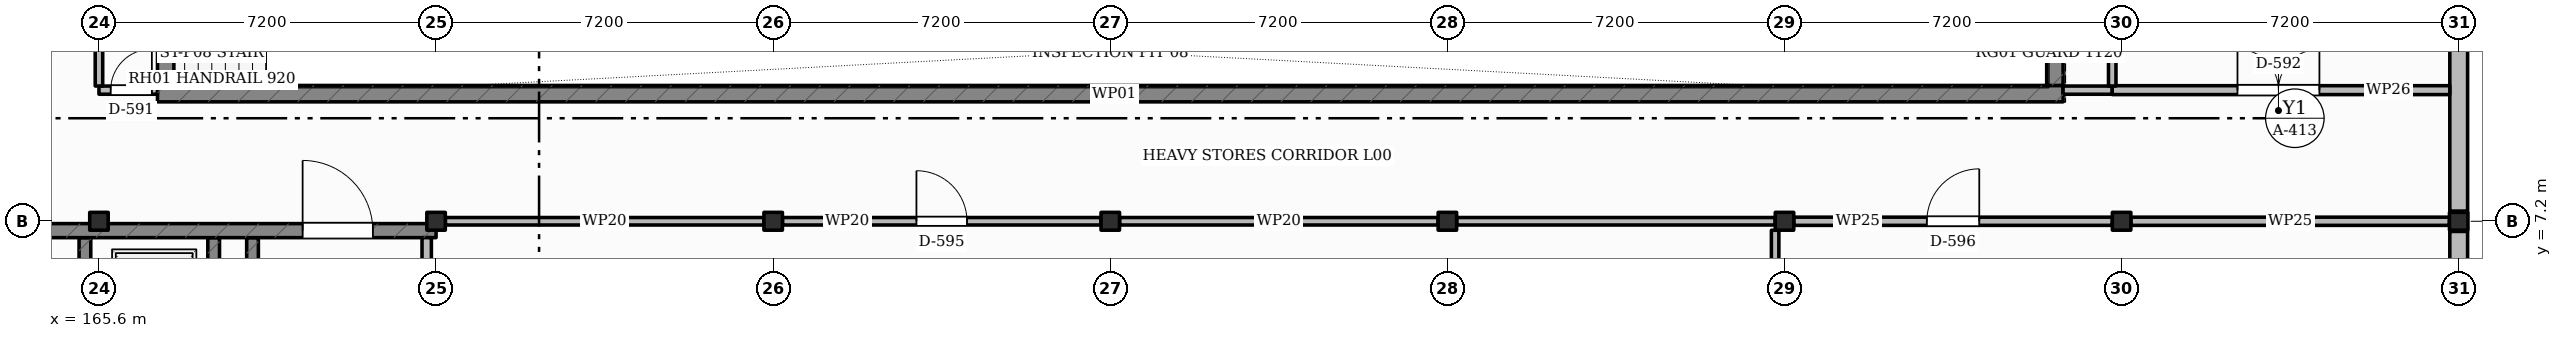
"""IFC4 building model, lengths in metres.
Left out: names, types, materials, properties, quantities, classifications, styles, units other than length and angle.
Written with IfcOpenShell. Run it as: python <this file> out.ifc"""

import sys

from ifc_helpers import new_model, si_unit, direction, frame, frame_2d, origin, origin_2d, place, context, subcontext, project, spatial, rectangle, i_section, extrude, element, fill, save


model = new_model("IFC4")
c1 = context("Model", 3, precision=1e-05, world=origin(), true_north=direction((0.0, 1.0)))
c2 = subcontext(c1, "Body", "Model", "MODEL_VIEW")
j1 = project(units=[si_unit("LENGTHUNIT", "METRE"), si_unit("PLANEANGLEUNIT", "RADIAN")], contexts=[c1])
p1 = place(None, origin())
s1 = spatial("IfcSite", under=j1, at=p1, CompositionType="ELEMENT")
p2 = place(p1, origin())
s2 = spatial("IfcBuilding", under=s1, at=p2, CompositionType="ELEMENT")
p3 = place(p2, origin())
s3 = spatial("IfcBuildingStorey", under=s2, at=p3, CompositionType="ELEMENT", Elevation=0.0)
p4 = place(p3, frame((166.85, 9.925, -1.55), z_axis=(0.0, 0.0, 1.0), x_axis=(1.0, 0.0, 0.0)))
e1 = element("IfcWall", 1, at=p4, inside=s3, PredefinedType="USERDEFINED", context=c2, shape_type="SweptSolid", body=[
    extrude(rectangle(XDim=40.7, YDim=0.35, at=frame_2d((20.35, 0.0))), origin(), (0.0, 0.0, 1.0), 1.55),
])
for number, where, z_axis, x_axis in (
    (2, (167.025, 10.1, -1.55), (0.0, 0.0, 1.0), (0.0, 1.0, 0.0)),
    (3, (207.375, 10.1, -1.55), (0.0, 0.0, 1.0), (0.0, 1.0, 0.0)),
):
    element("IfcWall", number, at=place(p3, frame(where, z_axis=z_axis, x_axis=x_axis)), inside=s3, PredefinedType="USERDEFINED", context=c2, shape_type="SweptSolid", body=[
        extrude(rectangle(XDim=1.4, YDim=0.35, at=frame_2d((0.7, 0.0))), origin(), (0.0, 0.0, 1.0), 1.55),
    ])
for number, where, z_axis, x_axis in (
    (4, (165.6, 7.2, -0.3), (0.0, 0.0, 1.0), (1.0, 0.0, 0.0)),
    (5, (172.8, 7.2, -0.3), (0.0, 0.0, 1.0), (1.0, 0.0, 0.0)),
    (6, (180.0, 7.2, -0.3), (0.0, 0.0, 1.0), (1.0, 0.0, 0.0)),
    (7, (187.2, 7.2, -0.3), (0.0, 0.0, 1.0), (1.0, 0.0, 0.0)),
    (8, (194.4, 7.2, -0.3), (0.0, 0.0, 1.0), (1.0, 0.0, 0.0)),
    (9, (201.6, 7.2, -0.3), (0.0, 0.0, 1.0), (1.0, 0.0, 0.0)),
    (10, (208.8, 7.2, -0.3), (0.0, 0.0, 1.0), (1.0, 0.0, 0.0)),
    (11, (216.0, 7.2, -0.3), (0.0, 0.0, 1.0), (1.0, 0.0, 0.0)),
):
    element("IfcColumn", number, at=place(p3, frame(where, z_axis=z_axis, x_axis=x_axis)), inside=s3, PredefinedType="COLUMN", context=c2, shape_type="SweptSolid", body=[
        extrude(i_section(OverallWidth=0.395, OverallDepth=0.381, WebThickness=0.018, FlangeThickness=0.03, FilletRadius=0.015, at=origin_2d()), origin(), (0.0, 0.0, 1.0), 5.7),
    ])
p5 = place(p3, frame((216.0, 14.183, 0.0), z_axis=(0.0, 0.0, 1.0), x_axis=(0.0, -1.0, 0.0)))
e12 = element("IfcWall", 12, at=p5, inside=s3, PredefinedType="SOLIDWALL", context=c2, shape_type="SweptSolid", body=[
    extrude(rectangle(XDim=6.765, YDim=0.38, at=frame_2d((3.383, 0.0))), origin(), (0.0, 0.0, 1.0), 4.413),
])
p6 = place(p5, frame((1.066, 0.0, 1.05)))
e13 = element("IfcOpeningElement", 13, at=p6, cuts=e12, PredefinedType="OPENING", context=c2, shape_type="SweptSolid", body=[
    extrude(rectangle(XDim=2.2, YDim=1.35, at=frame_2d((1.1, 0.675))), frame((0.0, 0.2, 0.0), z_axis=(0.0, -1.0, 0.0), x_axis=(1.0, 0.0, 0.0)), (0.0, 0.0, 1.0), 0.4),
])
p7 = place(p3, frame((216.0, 6.983, 0.0), z_axis=(0.0, 0.0, 1.0), x_axis=(0.0, -1.0, 0.0)))
e14 = element("IfcWall", 14, at=p7, inside=s3, PredefinedType="SOLIDWALL", context=c2, shape_type="SweptSolid", body=[
    extrude(rectangle(XDim=6.765, YDim=0.38, at=frame_2d((3.383, 0.0))), origin(), (0.0, 0.0, 1.0), 4.413),
])
p8 = place(p7, frame((2.058, 0.0, 1.05)))
e15 = element("IfcOpeningElement", 15, at=p8, cuts=e14, PredefinedType="OPENING", context=c2, shape_type="SweptSolid", body=[
    extrude(rectangle(XDim=2.65, YDim=1.6, at=frame_2d((1.325, 0.8))), frame((0.0, 0.2, 0.0), z_axis=(0.0, -1.0, 0.0), x_axis=(1.0, 0.0, 0.0)), (0.0, 0.0, 1.0), 0.4),
])
p9 = place(p3, frame((165.3, 0.18, 0.0), z_axis=(0.0, 0.0, 1.0), x_axis=(0.0, 1.0, 0.0)))
e16 = element("IfcWall", 16, at=p9, inside=s3, PredefinedType="SHEAR", context=c2, shape_type="SweptSolid", body=[
    extrude(rectangle(XDim=6.67, YDim=0.25, at=frame_2d((3.335, 0.0))), origin(), (0.0, 0.0, 1.0), 4.45),
])
p10 = place(p9, frame((1.12, 0.0, 0.0)))
e17 = element("IfcOpeningElement", 17, at=p10, cuts=e16, PredefinedType="OPENING", context=c2, shape_type="SweptSolid", body=[
    extrude(rectangle(XDim=1.35, YDim=2.15, at=frame_2d((0.675, 1.075))), frame((0.0, 0.135, 0.0), z_axis=(0.0, -1.0, 0.0), x_axis=(1.0, 0.0, 0.0)), (0.0, 0.0, 1.0), 0.27),
])
p11 = place(p3, frame((168.05, 3.885, 0.0), z_axis=(0.0, 0.0, 1.0), x_axis=(0.0, 1.0, 0.0)))
e18 = element("IfcWall", 18, at=p11, inside=s3, PredefinedType="SHEAR", context=c2, shape_type="SweptSolid", body=[
    extrude(rectangle(XDim=2.965, YDim=0.25, at=frame_2d((1.482, 0.0))), origin(), (0.0, 0.0, 1.0), 4.45),
])
p12 = place(p3, frame((168.88, 3.885, 0.0), z_axis=(0.0, 0.0, 1.0), x_axis=(0.0, 1.0, 0.0)))
e19 = element("IfcWall", 19, at=p12, inside=s3, PredefinedType="SHEAR", context=c2, shape_type="SweptSolid", body=[
    extrude(rectangle(XDim=2.965, YDim=0.25, at=frame_2d((1.482, 0.0))), origin(), (0.0, 0.0, 1.0), 4.45),
])
p13 = place(p12, frame((0.9, 0.0, 0.0)))
e20 = element("IfcOpeningElement", 20, at=p13, cuts=e19, PredefinedType="OPENING", context=c2, shape_type="SweptSolid", body=[
    extrude(rectangle(XDim=0.92, YDim=2.05, at=frame_2d((0.46, 1.025))), frame((0.0, 0.135, 0.0), z_axis=(0.0, -1.0, 0.0), x_axis=(1.0, 0.0, 0.0)), (0.0, 0.0, 1.0), 0.27),
])
p14 = place(p3, frame((158.57, 7.0, 0.0), z_axis=(0.0, 0.0, 1.0), x_axis=(1.0, 0.0, 0.0)))
e21 = element("IfcWall", 21, at=p14, inside=s3, PredefinedType="SHEAR", context=c2, shape_type="SweptSolid", body=[
    extrude(rectangle(XDim=14.23, YDim=0.3, at=frame_2d((7.115, 0.0))), origin(), (0.0, 0.0, 1.0), 4.45),
])
p15 = place(p14, frame((11.38, 0.0, 0.0)))
e22 = element("IfcOpeningElement", 22, at=p15, cuts=e21, PredefinedType="OPENING", context=c2, shape_type="SweptSolid", body=[
    extrude(rectangle(XDim=1.5, YDim=2.15, at=frame_2d((0.75, 1.075))), frame((0.0, 0.16, 0.0), z_axis=(0.0, -1.0, 0.0), x_axis=(1.0, 0.0, 0.0)), (0.0, 0.0, 1.0), 0.32),
])
p16 = place(p3, frame((172.6, 0.18, 0.0), z_axis=(0.0, 0.0, 1.0), x_axis=(0.0, 1.0, 0.0)))
e23 = element("IfcWall", 23, at=p16, inside=s3, PredefinedType="SOLIDWALL", context=c2, shape_type="SweptSolid", body=[
    extrude(rectangle(XDim=6.67, YDim=0.2, at=frame_2d((3.335, 0.0))), origin(), (0.0, 0.0, 1.0), 4.245),
])
p17 = place(p3, frame((165.6, 10.0, 0.0), z_axis=(0.0, 0.0, 1.0), x_axis=(1.0, 0.0, 0.0)))
e24 = element("IfcWall", 24, at=p17, inside=s3, PredefinedType="PARTITIONING", context=c2, shape_type="SweptSolid", body=[
    extrude(rectangle(XDim=1.25, YDim=0.175, at=frame_2d((0.625, 0.0))), origin(), (0.0, 0.0, 1.0), 3.55),
])
p18 = place(p17, frame((0.25, 0.0, 0.0)))
e25 = element("IfcOpeningElement", 25, at=p18, cuts=e24, PredefinedType="OPENING", context=c2, shape_type="SweptSolid", body=[
    extrude(rectangle(XDim=0.88, YDim=2.05, at=frame_2d((0.44, 1.025))), frame((0.0, 0.097, 0.0), z_axis=(0.0, -1.0, 0.0), x_axis=(1.0, 0.0, 0.0)), (0.0, 0.0, 1.0), 0.195),
])
p19 = place(p3, frame((207.55, 10.0, 0.0), z_axis=(0.0, 0.0, 1.0), x_axis=(1.0, 0.0, 0.0)))
e26 = element("IfcWall", 26, at=p19, inside=s3, PredefinedType="PARTITIONING", context=c2, shape_type="SweptSolid", body=[
    extrude(rectangle(XDim=1.05, YDim=0.175, at=frame_2d((0.525, 0.0))), origin(), (0.0, 0.0, 1.0), 3.55),
])
p20 = place(p3, frame((208.6, 10.0, 0.0), z_axis=(0.0, 0.0, 1.0), x_axis=(1.0, 0.0, 0.0)))
e27 = element("IfcWall", 27, at=p20, inside=s3, PredefinedType="PARTITIONING", context=c2, shape_type="SweptSolid", body=[
    extrude(rectangle(XDim=7.21, YDim=0.19, at=frame_2d((3.605, 0.0))), origin(), (0.0, 0.0, 1.0), 3.55),
])
p21 = place(p20, frame((2.675, 0.0, 0.0)))
e28 = element("IfcOpeningElement", 28, at=p21, cuts=e27, PredefinedType="OPENING", context=c2, shape_type="SweptSolid", body=[
    extrude(rectangle(XDim=1.75, YDim=2.25, at=frame_2d((0.875, 1.125))), frame((0.0, 0.105, 0.0), z_axis=(0.0, -1.0, 0.0), x_axis=(1.0, 0.0, 0.0)), (0.0, 0.0, 1.0), 0.21),
])
p22 = place(p3, frame((172.999, 7.2, 0.0), z_axis=(0.0, 0.0, 1.0), x_axis=(1.0, 0.0, 0.0)))
e29 = element("IfcWall", 29, at=p22, inside=s3, PredefinedType="PARTITIONING", context=c2, shape_type="SweptSolid", body=[
    extrude(rectangle(XDim=6.802, YDim=0.16, at=frame_2d((3.401, 0.0))), origin(), (0.0, 0.0, 1.0), 3.55),
])
p23 = place(p3, frame((180.199, 7.2, 0.0), z_axis=(0.0, 0.0, 1.0), x_axis=(1.0, 0.0, 0.0)))
e30 = element("IfcWall", 30, at=p23, inside=s3, PredefinedType="PARTITIONING", context=c2, shape_type="SweptSolid", body=[
    extrude(rectangle(XDim=6.802, YDim=0.16, at=frame_2d((3.401, 0.0))), origin(), (0.0, 0.0, 1.0), 3.55),
])
p24 = place(p23, frame((2.861, 0.0, 0.0)))
e31 = element("IfcOpeningElement", 31, at=p24, cuts=e30, PredefinedType="OPENING", context=c2, shape_type="SweptSolid", body=[
    extrude(rectangle(XDim=1.08, YDim=2.15, at=frame_2d((0.54, 1.075))), frame((0.0, 0.09, 0.0), z_axis=(0.0, -1.0, 0.0), x_axis=(1.0, 0.0, 0.0)), (0.0, 0.0, 1.0), 0.18),
])
p25 = place(p3, frame((187.399, 7.2, 0.0), z_axis=(0.0, 0.0, 1.0), x_axis=(1.0, 0.0, 0.0)))
e32 = element("IfcWall", 32, at=p25, inside=s3, PredefinedType="PARTITIONING", context=c2, shape_type="SweptSolid", body=[
    extrude(rectangle(XDim=6.802, YDim=0.16, at=frame_2d((3.401, 0.0))), origin(), (0.0, 0.0, 1.0), 3.55),
])
p26 = place(p3, frame((194.599, 7.2, 0.0), z_axis=(0.0, 0.0, 1.0), x_axis=(1.0, 0.0, 0.0)))
e33 = element("IfcWall", 33, at=p26, inside=s3, PredefinedType="PARTITIONING", context=c2, shape_type="SweptSolid", body=[
    extrude(rectangle(XDim=6.801, YDim=0.16, at=frame_2d((3.4, 0.0))), origin(), (0.0, 0.0, 1.0), 3.55),
])
p27 = place(p3, frame((201.799, 7.2, 0.0), z_axis=(0.0, 0.0, 1.0), x_axis=(1.0, 0.0, 0.0)))
e34 = element("IfcWall", 34, at=p27, inside=s3, PredefinedType="PARTITIONING", context=c2, shape_type="SweptSolid", body=[
    extrude(rectangle(XDim=6.802, YDim=0.175, at=frame_2d((3.401, 0.0))), origin(), (0.0, 0.0, 1.0), 3.55),
])
p28 = place(p27, frame((2.841, 0.0, 0.0)))
e35 = element("IfcOpeningElement", 35, at=p28, cuts=e34, PredefinedType="OPENING", context=c2, shape_type="SweptSolid", body=[
    extrude(rectangle(XDim=1.12, YDim=2.18, at=frame_2d((0.56, 1.09))), frame((0.0, 0.097, 0.0), z_axis=(0.0, -1.0, 0.0), x_axis=(1.0, 0.0, 0.0)), (0.0, 0.0, 1.0), 0.195),
])
p29 = place(p3, frame((208.999, 7.2, 0.0), z_axis=(0.0, 0.0, 1.0), x_axis=(1.0, 0.0, 0.0)))
e36 = element("IfcWall", 36, at=p29, inside=s3, PredefinedType="PARTITIONING", context=c2, shape_type="SweptSolid", body=[
    extrude(rectangle(XDim=6.802, YDim=0.175, at=frame_2d((3.401, 0.0))), origin(), (0.0, 0.0, 1.0), 3.55),
])
for number, where, z_axis, x_axis in (
    (37, (165.6, 10.088, 0.0), (0.0, 0.0, 1.0), (0.0, 1.0, 0.0)),
    (38, (208.6, 10.088, 0.0), (0.0, 0.0, 1.0), (0.0, 1.0, 0.0)),
):
    element("IfcWall", number, at=place(p3, frame(where, z_axis=z_axis, x_axis=x_axis)), inside=s3, PredefinedType="PARTITIONING", context=c2, shape_type="SweptSolid", body=[
        extrude(rectangle(XDim=4.119, YDim=0.16, at=frame_2d((2.06, 0.0))), origin(), (0.0, 0.0, 1.0), 3.55),
    ])
p30 = place(p3, frame((201.4, 0.193, 0.0), z_axis=(0.0, 0.0, 1.0), x_axis=(0.0, 1.0, 0.0)))
e39 = element("IfcWall", 39, at=p30, inside=s3, PredefinedType="PARTITIONING", context=c2, shape_type="SweptSolid", body=[
    extrude(rectangle(XDim=6.815, YDim=0.16, at=frame_2d((3.407, 0.0))), origin(), (0.0, 0.0, 1.0), 3.55),
])
p31 = place(p15, origin())
e40 = element("IfcDoor", 40, at=p31, inside=s3, OperationType="SINGLE_SWING_LEFT", PredefinedType="DOOR", context=c2, shape_type="SweptSolid", body=[
    extrude(rectangle(XDim=1.5, YDim=2.15, at=frame_2d((0.75, 1.075))), frame((0.0, 0.025, 0.0), z_axis=(0.0, -1.0, 0.0), x_axis=(1.0, 0.0, 0.0)), (0.0, 0.0, 1.0), 0.05),
])
fill(e22, e40)
p32 = place(p18, origin())
e41 = element("IfcDoor", 41, at=p32, inside=s3, OperationType="SINGLE_SWING_RIGHT", PredefinedType="DOOR", context=c2, shape_type="SweptSolid", body=[
    extrude(rectangle(XDim=0.88, YDim=2.05, at=frame_2d((0.44, 1.025))), frame((0.0, 0.025, 0.0), z_axis=(0.0, -1.0, 0.0), x_axis=(1.0, 0.0, 0.0)), (0.0, 0.0, 1.0), 0.05),
])
fill(e25, e41)
p33 = place(p21, origin())
e42 = element("IfcDoor", 42, at=p33, inside=s3, OperationType="DOUBLE_SWING_LEFT", PredefinedType="DOOR", context=c2, shape_type="SweptSolid", body=[
    extrude(rectangle(XDim=1.75, YDim=2.25, at=frame_2d((0.875, 1.125))), frame((0.0, 0.025, 0.0), z_axis=(0.0, -1.0, 0.0), x_axis=(1.0, 0.0, 0.0)), (0.0, 0.0, 1.0), 0.05),
])
fill(e28, e42)
p34 = place(p24, origin())
e43 = element("IfcDoor", 43, at=p34, inside=s3, OperationType="SINGLE_SWING_LEFT", PredefinedType="DOOR", context=c2, shape_type="SweptSolid", body=[
    extrude(rectangle(XDim=1.08, YDim=2.15, at=frame_2d((0.54, 1.075))), frame((0.0, 0.025, 0.0), z_axis=(0.0, -1.0, 0.0), x_axis=(1.0, 0.0, 0.0)), (0.0, 0.0, 1.0), 0.05),
])
fill(e31, e43)
p35 = place(p28, origin())
e44 = element("IfcDoor", 44, at=p35, inside=s3, OperationType="SINGLE_SWING_RIGHT", PredefinedType="DOOR", context=c2, shape_type="SweptSolid", body=[
    extrude(rectangle(XDim=1.12, YDim=2.18, at=frame_2d((0.56, 1.09))), frame((0.0, 0.025, 0.0), z_axis=(0.0, -1.0, 0.0), x_axis=(1.0, 0.0, 0.0)), (0.0, 0.0, 1.0), 0.05),
])
fill(e35, e44)
save(model, sys.argv[1])
